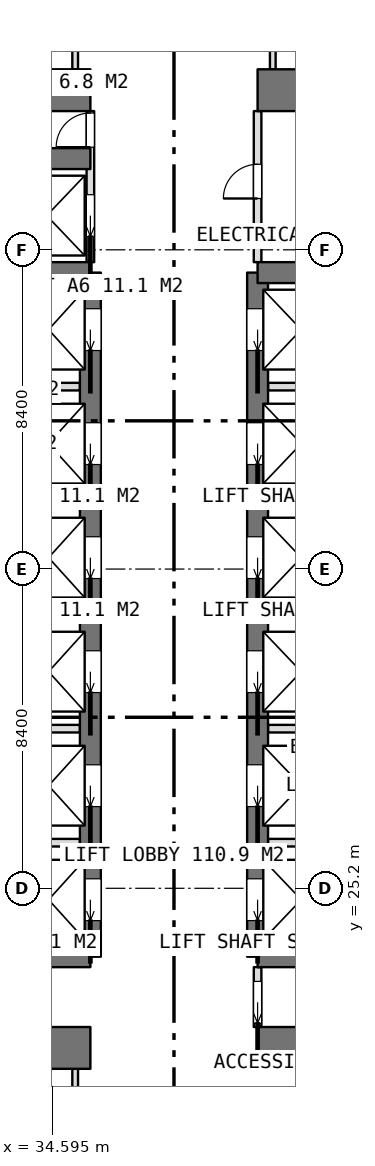
"""IFC4 building model, lengths in metres.
Left out: names, types, materials, properties, quantities, classifications, styles, units other than length and angle.
Written with IfcOpenShell. Run it as: python <this file> out.ifc"""

import sys

from ifc_helpers import new_model, si_unit, direction, frame, frame_2d, origin, place, context, subcontext, project, spatial, rectangle, extrude, element, fill, save


model = new_model("IFC4")
c1 = context("Model", 3, precision=1e-05, world=origin(), true_north=direction((0.0, 1.0)))
c2 = subcontext(c1, "Body", "Model", "MODEL_VIEW")
j1 = project(units=[si_unit("LENGTHUNIT", "METRE"), si_unit("PLANEANGLEUNIT", "RADIAN")], contexts=[c1])
p1 = place(None, origin())
s1 = spatial("IfcSite", under=j1, at=p1, CompositionType="ELEMENT")
p2 = place(p1, origin())
s2 = spatial("IfcBuilding", under=s1, at=p2, CompositionType="ELEMENT")
p3 = place(p2, origin())
s3 = spatial("IfcBuildingStorey", under=s2, at=p3, CompositionType="ELEMENT", Elevation=0.0)
p4 = place(p3, frame((25.2, 21.0, 0.0), z_axis=(0.0, 0.0, 1.0), x_axis=(1.0, 0.0, 0.0)))
e1 = element("IfcWall", 1, at=p4, inside=s3, PredefinedType="SHEAR", context=c2, shape_type="SweptSolid", body=[
    extrude(rectangle(XDim=10.4, YDim=1.1, at=frame_2d((5.2, 0.0))), origin(), (0.0, 0.0, 1.0), 5.4),
])
p5 = place(p3, frame((40.0, 21.0, 0.0), z_axis=(0.0, 0.0, 1.0), x_axis=(1.0, 0.0, 0.0)))
e2 = element("IfcWall", 2, at=p5, inside=s3, PredefinedType="SHEAR", context=c2, shape_type="SweptSolid", body=[
    extrude(rectangle(XDim=10.4, YDim=1.1, at=frame_2d((5.2, 0.0))), origin(), (0.0, 0.0, 1.0), 5.4),
])
p6 = place(p3, frame((25.2, 46.2, 0.0), z_axis=(0.0, 0.0, 1.0), x_axis=(1.0, 0.0, 0.0)))
e3 = element("IfcWall", 3, at=p6, inside=s3, PredefinedType="SHEAR", context=c2, shape_type="SweptSolid", body=[
    extrude(rectangle(XDim=10.4, YDim=1.1, at=frame_2d((5.2, 0.0))), origin(), (0.0, 0.0, 1.0), 5.4),
])
p7 = place(p3, frame((40.0, 46.2, 0.0), z_axis=(0.0, 0.0, 1.0), x_axis=(1.0, 0.0, 0.0)))
e4 = element("IfcWall", 4, at=p7, inside=s3, PredefinedType="SHEAR", context=c2, shape_type="SweptSolid", body=[
    extrude(rectangle(XDim=10.4, YDim=1.1, at=frame_2d((5.2, 0.0))), origin(), (0.0, 0.0, 1.0), 5.4),
])
p8 = place(p3, frame((35.6, 23.4, 0.0), z_axis=(0.0, 0.0, 1.0), x_axis=(0.0, 1.0, 0.0)))
e5 = element("IfcWall", 5, at=p8, inside=s3, PredefinedType="SHEAR", context=c2, shape_type="SweptSolid", body=[
    extrude(rectangle(XDim=18.0, YDim=0.55, at=frame_2d((9.0, 0.0))), origin(), (0.0, 0.0, 1.0), 5.4),
])
p9 = place(p8, frame((0.95, 0.0, 0.0)))
e6 = element("IfcOpeningElement", 6, at=p9, cuts=e5, PredefinedType="OPENING", context=c2, shape_type="SweptSolid", body=[
    extrude(rectangle(XDim=1.1, YDim=2.1, at=frame_2d((0.55, 1.05))), frame((0.0, 0.285, 0.0), z_axis=(0.0, -1.0, 0.0), x_axis=(1.0, 0.0, 0.0)), (0.0, 0.0, 1.0), 0.57),
])
p10 = place(p8, frame((3.95, 0.0, 0.0)))
e7 = element("IfcOpeningElement", 7, at=p10, cuts=e5, PredefinedType="OPENING", context=c2, shape_type="SweptSolid", body=[
    extrude(rectangle(XDim=1.1, YDim=2.1, at=frame_2d((0.55, 1.05))), frame((0.0, 0.285, 0.0), z_axis=(0.0, -1.0, 0.0), x_axis=(1.0, 0.0, 0.0)), (0.0, 0.0, 1.0), 0.57),
])
p11 = place(p8, frame((6.95, 0.0, 0.0)))
e8 = element("IfcOpeningElement", 8, at=p11, cuts=e5, PredefinedType="OPENING", context=c2, shape_type="SweptSolid", body=[
    extrude(rectangle(XDim=1.1, YDim=2.1, at=frame_2d((0.55, 1.05))), frame((0.0, 0.285, 0.0), z_axis=(0.0, -1.0, 0.0), x_axis=(1.0, 0.0, 0.0)), (0.0, 0.0, 1.0), 0.57),
])
p12 = place(p8, frame((9.95, 0.0, 0.0)))
e9 = element("IfcOpeningElement", 9, at=p12, cuts=e5, PredefinedType="OPENING", context=c2, shape_type="SweptSolid", body=[
    extrude(rectangle(XDim=1.1, YDim=2.1, at=frame_2d((0.55, 1.05))), frame((0.0, 0.285, 0.0), z_axis=(0.0, -1.0, 0.0), x_axis=(1.0, 0.0, 0.0)), (0.0, 0.0, 1.0), 0.57),
])
p13 = place(p8, frame((12.95, 0.0, 0.0)))
e10 = element("IfcOpeningElement", 10, at=p13, cuts=e5, PredefinedType="OPENING", context=c2, shape_type="SweptSolid", body=[
    extrude(rectangle(XDim=1.1, YDim=2.1, at=frame_2d((0.55, 1.05))), frame((0.0, 0.285, 0.0), z_axis=(0.0, -1.0, 0.0), x_axis=(1.0, 0.0, 0.0)), (0.0, 0.0, 1.0), 0.57),
])
p14 = place(p8, frame((15.95, 0.0, 0.0)))
e11 = element("IfcOpeningElement", 11, at=p14, cuts=e5, PredefinedType="OPENING", context=c2, shape_type="SweptSolid", body=[
    extrude(rectangle(XDim=1.1, YDim=2.1, at=frame_2d((0.55, 1.05))), frame((0.0, 0.285, 0.0), z_axis=(0.0, -1.0, 0.0), x_axis=(1.0, 0.0, 0.0)), (0.0, 0.0, 1.0), 0.57),
])
p15 = place(p3, frame((40.0, 23.4, 0.0), z_axis=(0.0, 0.0, 1.0), x_axis=(0.0, 1.0, 0.0)))
e12 = element("IfcWall", 12, at=p15, inside=s3, PredefinedType="SHEAR", context=c2, shape_type="SweptSolid", body=[
    extrude(rectangle(XDim=18.0, YDim=0.55, at=frame_2d((9.0, 0.0))), origin(), (0.0, 0.0, 1.0), 5.4),
])
p16 = place(p15, frame((0.95, 0.0, 0.0)))
e13 = element("IfcOpeningElement", 13, at=p16, cuts=e12, PredefinedType="OPENING", context=c2, shape_type="SweptSolid", body=[
    extrude(rectangle(XDim=1.1, YDim=2.1, at=frame_2d((0.55, 1.05))), frame((0.0, 0.285, 0.0), z_axis=(0.0, -1.0, 0.0), x_axis=(1.0, 0.0, 0.0)), (0.0, 0.0, 1.0), 0.57),
])
p17 = place(p15, frame((3.95, 0.0, 0.0)))
e14 = element("IfcOpeningElement", 14, at=p17, cuts=e12, PredefinedType="OPENING", context=c2, shape_type="SweptSolid", body=[
    extrude(rectangle(XDim=1.1, YDim=2.1, at=frame_2d((0.55, 1.05))), frame((0.0, 0.285, 0.0), z_axis=(0.0, -1.0, 0.0), x_axis=(1.0, 0.0, 0.0)), (0.0, 0.0, 1.0), 0.57),
])
p18 = place(p15, frame((6.95, 0.0, 0.0)))
e15 = element("IfcOpeningElement", 15, at=p18, cuts=e12, PredefinedType="OPENING", context=c2, shape_type="SweptSolid", body=[
    extrude(rectangle(XDim=1.1, YDim=2.1, at=frame_2d((0.55, 1.05))), frame((0.0, 0.285, 0.0), z_axis=(0.0, -1.0, 0.0), x_axis=(1.0, 0.0, 0.0)), (0.0, 0.0, 1.0), 0.57),
])
p19 = place(p15, frame((9.95, 0.0, 0.0)))
e16 = element("IfcOpeningElement", 16, at=p19, cuts=e12, PredefinedType="OPENING", context=c2, shape_type="SweptSolid", body=[
    extrude(rectangle(XDim=1.1, YDim=2.1, at=frame_2d((0.55, 1.05))), frame((0.0, 0.285, 0.0), z_axis=(0.0, -1.0, 0.0), x_axis=(1.0, 0.0, 0.0)), (0.0, 0.0, 1.0), 0.57),
])
p20 = place(p15, frame((12.95, 0.0, 0.0)))
e17 = element("IfcOpeningElement", 17, at=p20, cuts=e12, PredefinedType="OPENING", context=c2, shape_type="SweptSolid", body=[
    extrude(rectangle(XDim=1.1, YDim=2.1, at=frame_2d((0.55, 1.05))), frame((0.0, 0.285, 0.0), z_axis=(0.0, -1.0, 0.0), x_axis=(1.0, 0.0, 0.0)), (0.0, 0.0, 1.0), 0.57),
])
p21 = place(p15, frame((15.95, 0.0, 0.0)))
e18 = element("IfcOpeningElement", 18, at=p21, cuts=e12, PredefinedType="OPENING", context=c2, shape_type="SweptSolid", body=[
    extrude(rectangle(XDim=1.1, YDim=2.1, at=frame_2d((0.55, 1.05))), frame((0.0, 0.285, 0.0), z_axis=(0.0, -1.0, 0.0), x_axis=(1.0, 0.0, 0.0)), (0.0, 0.0, 1.0), 0.57),
])
for number, where, z_axis, x_axis in (
    (19, (31.8, 23.4, 0.0), (0.0, 0.0, 1.0), (1.0, 0.0, 0.0)),
    (20, (31.8, 41.4, 0.0), (0.0, 0.0, 1.0), (1.0, 0.0, 0.0)),
    (21, (31.8, 44.4, 0.0), (0.0, 0.0, 1.0), (1.0, 0.0, 0.0)),
    (22, (40.0, 23.4, 0.0), (0.0, 0.0, 1.0), (1.0, 0.0, 0.0)),
    (23, (40.0, 41.4, 0.0), (0.0, 0.0, 1.0), (1.0, 0.0, 0.0)),
):
    element("IfcWall", number, at=place(p3, frame(where, z_axis=z_axis, x_axis=x_axis)), inside=s3, PredefinedType="SHEAR", context=c2, shape_type="SweptSolid", body=[
        extrude(rectangle(XDim=3.8, YDim=0.55, at=frame_2d((1.9, 0.0))), origin(), (0.0, 0.0, 1.0), 5.4),
    ])
for number, where, z_axis, x_axis in (
    (24, (32.075, 26.4, 0.0), (0.0, 0.0, 1.0), (1.0, 0.0, 0.0)),
    (25, (32.075, 29.4, 0.0), (0.0, 0.0, 1.0), (1.0, 0.0, 0.0)),
    (26, (32.075, 32.4, 0.0), (0.0, 0.0, 1.0), (1.0, 0.0, 0.0)),
    (27, (32.075, 35.4, 0.0), (0.0, 0.0, 1.0), (1.0, 0.0, 0.0)),
    (28, (32.075, 38.4, 0.0), (0.0, 0.0, 1.0), (1.0, 0.0, 0.0)),
    (29, (40.275, 26.4, 0.0), (0.0, 0.0, 1.0), (1.0, 0.0, 0.0)),
    (30, (40.275, 29.4, 0.0), (0.0, 0.0, 1.0), (1.0, 0.0, 0.0)),
    (31, (40.275, 32.4, 0.0), (0.0, 0.0, 1.0), (1.0, 0.0, 0.0)),
    (32, (40.275, 35.4, 0.0), (0.0, 0.0, 1.0), (1.0, 0.0, 0.0)),
    (33, (40.275, 38.4, 0.0), (0.0, 0.0, 1.0), (1.0, 0.0, 0.0)),
):
    element("IfcWall", number, at=place(p3, frame(where, z_axis=z_axis, x_axis=x_axis)), inside=s3, PredefinedType="PARTITIONING", context=c2, shape_type="SweptSolid", body=[
        extrude(rectangle(XDim=3.25, YDim=0.2, at=frame_2d((1.625, 0.0))), origin(), (0.0, 0.0, 1.0), 5.1),
    ])
p22 = place(p3, frame((40.0, 21.55, 0.0), z_axis=(0.0, 0.0, 1.0), x_axis=(0.0, 1.0, 0.0)))
e34 = element("IfcWall", 34, at=p22, inside=s3, PredefinedType="PARTITIONING", context=c2, shape_type="SweptSolid", body=[
    extrude(rectangle(XDim=1.575, YDim=0.2, at=frame_2d((0.788, 0.0))), origin(), (0.0, 0.0, 1.0), 5.1),
])
p23 = place(p22, frame((0.1, 0.0, 0.0)))
e35 = element("IfcOpeningElement", 35, at=p23, cuts=e34, PredefinedType="OPENING", context=c2, shape_type="SweptSolid", body=[
    extrude(rectangle(XDim=1.1, YDim=2.1, at=frame_2d((0.55, 1.05))), frame((0.0, 0.11, 0.0), z_axis=(0.0, -1.0, 0.0), x_axis=(1.0, 0.0, 0.0)), (0.0, 0.0, 1.0), 0.22),
])
p24 = place(p3, frame((40.0, 41.675, 0.0), z_axis=(0.0, 0.0, 1.0), x_axis=(0.0, 1.0, 0.0)))
e36 = element("IfcWall", 36, at=p24, inside=s3, PredefinedType="PARTITIONING", context=c2, shape_type="SweptSolid", body=[
    extrude(rectangle(XDim=3.975, YDim=0.2, at=frame_2d((1.987, 0.0))), origin(), (0.0, 0.0, 1.0), 5.1),
])
p25 = place(p24, frame((1.675, 0.0, 0.0)))
e37 = element("IfcOpeningElement", 37, at=p25, cuts=e36, PredefinedType="OPENING", context=c2, shape_type="SweptSolid", body=[
    extrude(rectangle(XDim=0.9, YDim=2.1, at=frame_2d((0.45, 1.05))), frame((0.0, 0.11, 0.0), z_axis=(0.0, -1.0, 0.0), x_axis=(1.0, 0.0, 0.0)), (0.0, 0.0, 1.0), 0.22),
])
p26 = place(p3, frame((35.6, 41.675, 0.0), z_axis=(0.0, 0.0, 1.0), x_axis=(0.0, 1.0, 0.0)))
e38 = element("IfcWall", 38, at=p26, inside=s3, PredefinedType="PARTITIONING", context=c2, shape_type="SweptSolid", body=[
    extrude(rectangle(XDim=3.975, YDim=0.2, at=frame_2d((1.987, 0.0))), origin(), (0.0, 0.0, 1.0), 5.1),
])
p27 = place(p26, frame((3.025, 0.0, 0.0)))
e39 = element("IfcOpeningElement", 39, at=p27, cuts=e38, PredefinedType="OPENING", context=c2, shape_type="SweptSolid", body=[
    extrude(rectangle(XDim=0.9, YDim=2.1, at=frame_2d((0.45, 1.05))), frame((0.0, 0.11, 0.0), z_axis=(0.0, -1.0, 0.0), x_axis=(1.0, 0.0, 0.0)), (0.0, 0.0, 1.0), 0.22),
])
p28 = place(p26, frame((0.675, 0.0, 0.0)))
e40 = element("IfcOpeningElement", 40, at=p28, cuts=e38, PredefinedType="OPENING", context=c2, shape_type="SweptSolid", body=[
    extrude(rectangle(XDim=1.1, YDim=2.1, at=frame_2d((0.55, 1.05))), frame((0.0, 0.11, 0.0), z_axis=(0.0, -1.0, 0.0), x_axis=(1.0, 0.0, 0.0)), (0.0, 0.0, 1.0), 0.22),
])
for number, where, z_axis, x_axis in (
    (41, (40.4, 46.75, 0.0), (0.0, 0.0, 1.0), (0.0, 1.0, 0.0)),
    (42, (35.2, 46.75, 0.0), (0.0, 0.0, 1.0), (0.0, 1.0, 0.0)),
    (43, (35.2, 17.875, 0.0), (0.0, 0.0, 1.0), (0.0, 1.0, 0.0)),
):
    element("IfcWall", number, at=place(p3, frame(where, z_axis=z_axis, x_axis=x_axis)), inside=s3, PredefinedType="PARTITIONING", context=c2, shape_type="SweptSolid", body=[
        extrude(rectangle(XDim=2.575, YDim=0.15, at=frame_2d((1.288, 0.0))), origin(), (0.0, 0.0, 1.0), 5.1),
    ])
p29 = place(p23, origin())
e44 = element("IfcDoor", 44, at=p29, inside=s3, OperationType="SLIDING_TO_LEFT", PredefinedType="DOOR", context=c2, shape_type="SweptSolid", body=[
    extrude(rectangle(XDim=1.1, YDim=2.1, at=frame_2d((0.55, 1.05))), frame((0.0, 0.025, 0.0), z_axis=(0.0, -1.0, 0.0), x_axis=(1.0, 0.0, 0.0)), (0.0, 0.0, 1.0), 0.05),
])
fill(e35, e44)
p30 = place(p25, origin())
e45 = element("IfcDoor", 45, at=p30, inside=s3, OperationType="SINGLE_SWING_LEFT", PredefinedType="DOOR", context=c2, shape_type="SweptSolid", body=[
    extrude(rectangle(XDim=0.9, YDim=2.1, at=frame_2d((0.45, 1.05))), frame((0.0, 0.025, 0.0), z_axis=(0.0, -1.0, 0.0), x_axis=(1.0, 0.0, 0.0)), (0.0, 0.0, 1.0), 0.05),
])
fill(e37, e45)
p31 = place(p27, origin())
e46 = element("IfcDoor", 46, at=p31, inside=s3, OperationType="SINGLE_SWING_LEFT", PredefinedType="DOOR", context=c2, shape_type="SweptSolid", body=[
    extrude(rectangle(XDim=0.9, YDim=2.1, at=frame_2d((0.45, 1.05))), frame((0.0, 0.025, 0.0), z_axis=(0.0, -1.0, 0.0), x_axis=(1.0, 0.0, 0.0)), (0.0, 0.0, 1.0), 0.05),
])
fill(e39, e46)
p32 = place(p9, origin())
e47 = element("IfcDoor", 47, at=p32, inside=s3, OperationType="SLIDING_TO_LEFT", PredefinedType="USERDEFINED", context=c2, shape_type="SweptSolid", body=[
    extrude(rectangle(XDim=1.1, YDim=2.1, at=frame_2d((0.55, 1.05))), frame((0.0, 0.025, 0.0), z_axis=(0.0, -1.0, 0.0), x_axis=(1.0, 0.0, 0.0)), (0.0, 0.0, 1.0), 0.05),
])
fill(e6, e47)
p33 = place(p10, origin())
e48 = element("IfcDoor", 48, at=p33, inside=s3, OperationType="SLIDING_TO_LEFT", PredefinedType="USERDEFINED", context=c2, shape_type="SweptSolid", body=[
    extrude(rectangle(XDim=1.1, YDim=2.1, at=frame_2d((0.55, 1.05))), frame((0.0, 0.025, 0.0), z_axis=(0.0, -1.0, 0.0), x_axis=(1.0, 0.0, 0.0)), (0.0, 0.0, 1.0), 0.05),
])
fill(e7, e48)
p34 = place(p11, origin())
e49 = element("IfcDoor", 49, at=p34, inside=s3, OperationType="SLIDING_TO_LEFT", PredefinedType="USERDEFINED", context=c2, shape_type="SweptSolid", body=[
    extrude(rectangle(XDim=1.1, YDim=2.1, at=frame_2d((0.55, 1.05))), frame((0.0, 0.025, 0.0), z_axis=(0.0, -1.0, 0.0), x_axis=(1.0, 0.0, 0.0)), (0.0, 0.0, 1.0), 0.05),
])
fill(e8, e49)
p35 = place(p12, origin())
e50 = element("IfcDoor", 50, at=p35, inside=s3, OperationType="SLIDING_TO_LEFT", PredefinedType="USERDEFINED", context=c2, shape_type="SweptSolid", body=[
    extrude(rectangle(XDim=1.1, YDim=2.1, at=frame_2d((0.55, 1.05))), frame((0.0, 0.025, 0.0), z_axis=(0.0, -1.0, 0.0), x_axis=(1.0, 0.0, 0.0)), (0.0, 0.0, 1.0), 0.05),
])
fill(e9, e50)
p36 = place(p13, origin())
e51 = element("IfcDoor", 51, at=p36, inside=s3, OperationType="SLIDING_TO_LEFT", PredefinedType="USERDEFINED", context=c2, shape_type="SweptSolid", body=[
    extrude(rectangle(XDim=1.1, YDim=2.1, at=frame_2d((0.55, 1.05))), frame((0.0, 0.025, 0.0), z_axis=(0.0, -1.0, 0.0), x_axis=(1.0, 0.0, 0.0)), (0.0, 0.0, 1.0), 0.05),
])
fill(e10, e51)
p37 = place(p14, origin())
e52 = element("IfcDoor", 52, at=p37, inside=s3, OperationType="SLIDING_TO_LEFT", PredefinedType="USERDEFINED", context=c2, shape_type="SweptSolid", body=[
    extrude(rectangle(XDim=1.1, YDim=2.1, at=frame_2d((0.55, 1.05))), frame((0.0, 0.025, 0.0), z_axis=(0.0, -1.0, 0.0), x_axis=(1.0, 0.0, 0.0)), (0.0, 0.0, 1.0), 0.05),
])
fill(e11, e52)
p38 = place(p16, origin())
e53 = element("IfcDoor", 53, at=p38, inside=s3, OperationType="SLIDING_TO_LEFT", PredefinedType="USERDEFINED", context=c2, shape_type="SweptSolid", body=[
    extrude(rectangle(XDim=1.1, YDim=2.1, at=frame_2d((0.55, 1.05))), frame((0.0, 0.025, 0.0), z_axis=(0.0, -1.0, 0.0), x_axis=(1.0, 0.0, 0.0)), (0.0, 0.0, 1.0), 0.05),
])
fill(e13, e53)
p39 = place(p17, origin())
e54 = element("IfcDoor", 54, at=p39, inside=s3, OperationType="SLIDING_TO_LEFT", PredefinedType="USERDEFINED", context=c2, shape_type="SweptSolid", body=[
    extrude(rectangle(XDim=1.1, YDim=2.1, at=frame_2d((0.55, 1.05))), frame((0.0, 0.025, 0.0), z_axis=(0.0, -1.0, 0.0), x_axis=(1.0, 0.0, 0.0)), (0.0, 0.0, 1.0), 0.05),
])
fill(e14, e54)
p40 = place(p18, origin())
e55 = element("IfcDoor", 55, at=p40, inside=s3, OperationType="SLIDING_TO_LEFT", PredefinedType="USERDEFINED", context=c2, shape_type="SweptSolid", body=[
    extrude(rectangle(XDim=1.1, YDim=2.1, at=frame_2d((0.55, 1.05))), frame((0.0, 0.025, 0.0), z_axis=(0.0, -1.0, 0.0), x_axis=(1.0, 0.0, 0.0)), (0.0, 0.0, 1.0), 0.05),
])
fill(e15, e55)
p41 = place(p19, origin())
e56 = element("IfcDoor", 56, at=p41, inside=s3, OperationType="SLIDING_TO_LEFT", PredefinedType="USERDEFINED", context=c2, shape_type="SweptSolid", body=[
    extrude(rectangle(XDim=1.1, YDim=2.1, at=frame_2d((0.55, 1.05))), frame((0.0, 0.025, 0.0), z_axis=(0.0, -1.0, 0.0), x_axis=(1.0, 0.0, 0.0)), (0.0, 0.0, 1.0), 0.05),
])
fill(e16, e56)
p42 = place(p20, origin())
e57 = element("IfcDoor", 57, at=p42, inside=s3, OperationType="SLIDING_TO_LEFT", PredefinedType="USERDEFINED", context=c2, shape_type="SweptSolid", body=[
    extrude(rectangle(XDim=1.1, YDim=2.1, at=frame_2d((0.55, 1.05))), frame((0.0, 0.025, 0.0), z_axis=(0.0, -1.0, 0.0), x_axis=(1.0, 0.0, 0.0)), (0.0, 0.0, 1.0), 0.05),
])
fill(e17, e57)
p43 = place(p21, origin())
e58 = element("IfcDoor", 58, at=p43, inside=s3, OperationType="SLIDING_TO_LEFT", PredefinedType="USERDEFINED", context=c2, shape_type="SweptSolid", body=[
    extrude(rectangle(XDim=1.1, YDim=2.1, at=frame_2d((0.55, 1.05))), frame((0.0, 0.025, 0.0), z_axis=(0.0, -1.0, 0.0), x_axis=(1.0, 0.0, 0.0)), (0.0, 0.0, 1.0), 0.05),
])
fill(e18, e58)
p44 = place(p28, origin())
e59 = element("IfcDoor", 59, at=p44, inside=s3, OperationType="SLIDING_TO_LEFT", PredefinedType="USERDEFINED", context=c2, shape_type="SweptSolid", body=[
    extrude(rectangle(XDim=1.1, YDim=2.1, at=frame_2d((0.55, 1.05))), frame((0.0, 0.025, 0.0), z_axis=(0.0, -1.0, 0.0), x_axis=(1.0, 0.0, 0.0)), (0.0, 0.0, 1.0), 0.05),
])
fill(e40, e59)
save(model, sys.argv[1])
